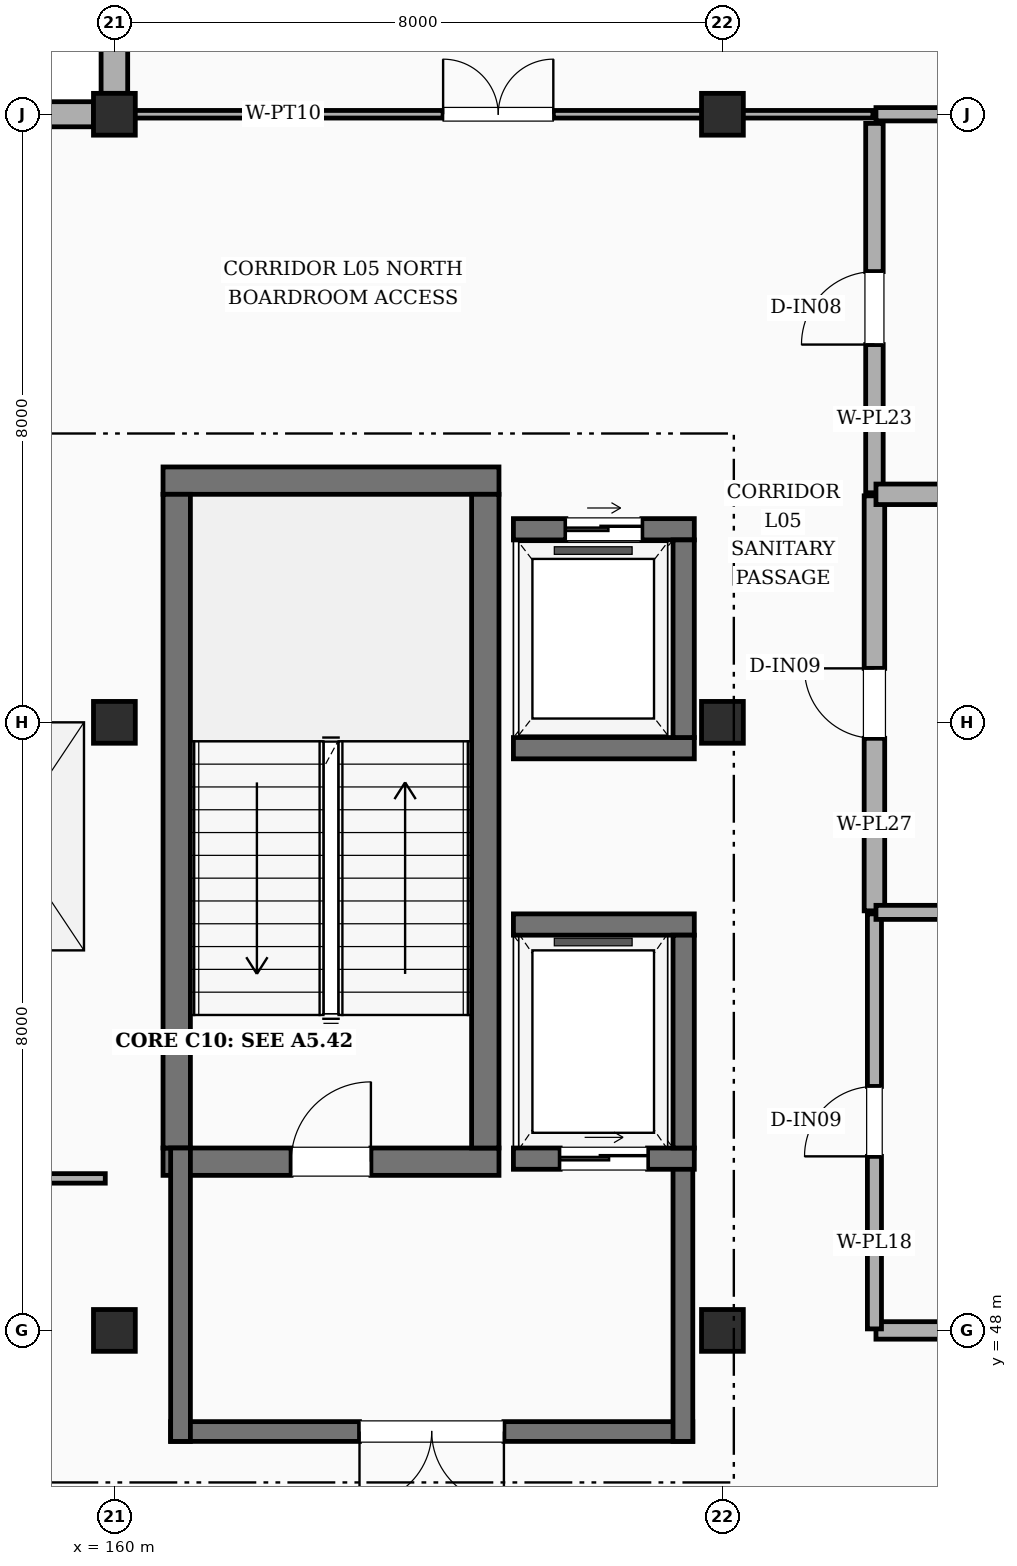
"""IFC4 building model, lengths in metres.
Left out: names, types, materials, properties, quantities, classifications, styles, units other than length and angle.
Written with IfcOpenShell. Run it as: python <this file> out.ifc"""

import sys

from ifc_helpers import new_model, si_unit, direction, frame, frame_2d, origin, origin_2d, place, context, subcontext, project, spatial, rectangle, extrude, element, fill, save


model = new_model("IFC4")
c1 = context("Model", 3, precision=1e-05, world=origin(), true_north=direction((0.0, 1.0)))
c2 = subcontext(c1, "Body", "Model", "MODEL_VIEW")
j1 = project(units=[si_unit("LENGTHUNIT", "METRE"), si_unit("PLANEANGLEUNIT", "RADIAN")], contexts=[c1])
p1 = place(None, origin())
s1 = spatial("IfcSite", under=j1, at=p1, CompositionType="ELEMENT")
p2 = place(p1, origin())
s2 = spatial("IfcBuilding", under=s1, at=p2, CompositionType="ELEMENT")
p3 = place(p2, frame((0.0, 0.0, 23.4)))
s3 = spatial("IfcBuildingStorey", under=s2, at=p3, CompositionType="ELEMENT", Elevation=23.4)
for number, where, z_axis, x_axis in (
    (1, (160.0, 48.0, 0.0), (0.0, 0.0, 1.0), (1.0, 0.0, 0.0)),
    (2, (160.0, 56.0, 0.0), (0.0, 0.0, 1.0), (1.0, 0.0, 0.0)),
    (3, (160.0, 64.0, 0.0), (0.0, 0.0, 1.0), (1.0, 0.0, 0.0)),
    (4, (168.0, 48.0, 0.0), (0.0, 0.0, 1.0), (1.0, 0.0, 0.0)),
    (5, (168.0, 56.0, 0.0), (0.0, 0.0, 1.0), (1.0, 0.0, 0.0)),
    (6, (168.0, 64.0, 0.0), (0.0, 0.0, 1.0), (1.0, 0.0, 0.0)),
):
    element("IfcColumn", number, at=place(p3, frame(where, z_axis=z_axis, x_axis=x_axis)), inside=s3, PredefinedType="COLUMN", context=c2, shape_type="SweptSolid", body=[
        extrude(rectangle(XDim=0.55, YDim=0.55, at=origin_2d()), origin(), (0.0, 0.0, 1.0), 4.2),
    ])
p4 = place(p3, frame((160.0, 71.725, 0.0), z_axis=(0.0, 0.0, 1.0), x_axis=(0.0, -1.0, 0.0)))
e7 = element("IfcWall", 7, at=p4, inside=s3, PredefinedType="STANDARD", context=c2, shape_type="SweptSolid", body=[
    extrude(rectangle(XDim=7.45, YDim=0.35, at=frame_2d((3.725, 0.0))), origin(), (0.0, 0.0, 1.0), 3.442),
])
p5 = place(p4, frame((2.75, 0.0, 0.95)))
e8 = element("IfcOpeningElement", 8, at=p5, cuts=e7, PredefinedType="OPENING", context=c2, shape_type="SweptSolid", body=[
    extrude(rectangle(XDim=1.95, YDim=1.95, at=frame_2d((0.975, 0.975))), frame((0.0, 0.185, 0.0), z_axis=(0.0, -1.0, 0.0), x_axis=(1.0, 0.0, 0.0)), (0.0, 0.0, 1.0), 0.37),
])
p6 = place(p3, frame((159.725, 64.0, 0.0), z_axis=(0.0, 0.0, 1.0), x_axis=(-1.0, 0.0, 0.0)))
e9 = element("IfcWall", 9, at=p6, inside=s3, PredefinedType="STANDARD", context=c2, shape_type="SweptSolid", body=[
    extrude(rectangle(XDim=7.45, YDim=0.33, at=frame_2d((3.725, 0.0))), origin(), (0.0, 0.0, 1.0), 3.97),
])
p7 = place(p6, frame((2.4, 0.0, 0.95)))
e10 = element("IfcOpeningElement", 10, at=p7, cuts=e9, PredefinedType="OPENING", context=c2, shape_type="SweptSolid", body=[
    extrude(rectangle(XDim=2.65, YDim=1.95, at=frame_2d((1.325, 0.975))), frame((0.0, 0.175, 0.0), z_axis=(0.0, -1.0, 0.0), x_axis=(1.0, 0.0, 0.0)), (0.0, 0.0, 1.0), 0.35),
])
p8 = place(p3, frame((160.64, 50.22, 0.0), z_axis=(0.0, 0.0, 1.0), x_axis=(1.0, 0.0, 0.0)))
e11 = element("IfcWall", 11, at=p8, inside=s3, PredefinedType="SHEAR", context=c2, shape_type="SweptSolid", body=[
    extrude(rectangle(XDim=4.42, YDim=0.36, at=frame_2d((2.21, 0.0))), origin(), (0.0, 0.0, 1.0), 4.2),
])
p9 = place(p8, frame((1.685, 0.0, 0.0)))
e12 = element("IfcOpeningElement", 12, at=p9, cuts=e11, PredefinedType="OPENING", context=c2, shape_type="SweptSolid", body=[
    extrude(rectangle(XDim=1.05, YDim=2.15, at=frame_2d((0.525, 1.075))), frame((0.0, 0.19, 0.0), z_axis=(0.0, -1.0, 0.0), x_axis=(1.0, 0.0, 0.0)), (0.0, 0.0, 1.0), 0.38),
])
p10 = place(p3, frame((160.64, 59.18, 0.0), z_axis=(0.0, 0.0, 1.0), x_axis=(1.0, 0.0, 0.0)))
e13 = element("IfcWall", 13, at=p10, inside=s3, PredefinedType="SHEAR", context=c2, shape_type="SweptSolid", body=[
    extrude(rectangle(XDim=4.42, YDim=0.36, at=frame_2d((2.21, 0.0))), origin(), (0.0, 0.0, 1.0), 4.2),
])
for number, where, z_axis, x_axis in (
    (14, (160.82, 50.4, 0.0), (0.0, 0.0, 1.0), (0.0, 1.0, 0.0)),
    (15, (164.88, 50.4, 0.0), (0.0, 0.0, 1.0), (0.0, 1.0, 0.0)),
):
    element("IfcWall", number, at=place(p3, frame(where, z_axis=z_axis, x_axis=x_axis)), inside=s3, PredefinedType="SHEAR", context=c2, shape_type="SweptSolid", body=[
        extrude(rectangle(XDim=8.6, YDim=0.36, at=frame_2d((4.3, 0.0))), origin(), (0.0, 0.0, 1.0), 4.2),
    ])
p11 = place(p3, frame((167.61, 46.67, 0.0), z_axis=(0.0, 0.0, 1.0), x_axis=(-1.0, 0.0, 0.0)))
e16 = element("IfcWall", 16, at=p11, inside=s3, PredefinedType="SHEAR", context=c2, shape_type="SweptSolid", body=[
    extrude(rectangle(XDim=6.87, YDim=0.26, at=frame_2d((3.435, 0.0))), origin(), (0.0, 0.0, 1.0), 4.2),
])
p12 = place(p11, frame((2.485, 0.0, 0.0)))
e17 = element("IfcOpeningElement", 17, at=p12, cuts=e16, PredefinedType="OPENING", context=c2, shape_type="SweptSolid", body=[
    extrude(rectangle(XDim=1.9, YDim=2.25, at=frame_2d((0.95, 1.125))), frame((0.0, 0.14, 0.0), z_axis=(0.0, -1.0, 0.0), x_axis=(1.0, 0.0, 0.0)), (0.0, 0.0, 1.0), 0.28),
])
for number, where, z_axis, x_axis in (
    (18, (160.87, 46.54, 0.0), (0.0, 0.0, 1.0), (0.0, 1.0, 0.0)),
    (19, (167.48, 46.54, 0.0), (0.0, 0.0, 1.0), (0.0, 1.0, 0.0)),
):
    element("IfcWall", number, at=place(p3, frame(where, z_axis=z_axis, x_axis=x_axis)), inside=s3, PredefinedType="SHEAR", context=c2, shape_type="SweptSolid", body=[
        extrude(rectangle(XDim=3.86, YDim=0.26, at=frame_2d((1.93, 0.0))), origin(), (0.0, 0.0, 1.0), 4.2),
    ])
p13 = place(p3, frame((165.25, 50.26, 0.0), z_axis=(0.0, 0.0, 1.0), x_axis=(1.0, 0.0, 0.0)))
e20 = element("IfcWall", 20, at=p13, inside=s3, PredefinedType="SHEAR", context=c2, shape_type="SweptSolid", body=[
    extrude(rectangle(XDim=2.38, YDim=0.28, at=frame_2d((1.19, 0.0))), origin(), (0.0, 0.0, 1.0), 4.2),
])
p14 = place(p13, frame((0.615, 0.0, 0.0)))
e21 = element("IfcOpeningElement", 21, at=p14, cuts=e20, PredefinedType="OPENING", context=c2, shape_type="SweptSolid", body=[
    extrude(rectangle(XDim=1.15, YDim=2.2, at=frame_2d((0.575, 1.1))), frame((0.0, 0.15, 0.0), z_axis=(0.0, -1.0, 0.0), x_axis=(1.0, 0.0, 0.0)), (0.0, 0.0, 1.0), 0.3),
])
p15 = place(p3, frame((165.25, 53.34, 0.0), z_axis=(0.0, 0.0, 1.0), x_axis=(1.0, 0.0, 0.0)))
e22 = element("IfcWall", 22, at=p15, inside=s3, PredefinedType="SHEAR", context=c2, shape_type="SweptSolid", body=[
    extrude(rectangle(XDim=2.38, YDim=0.28, at=frame_2d((1.19, 0.0))), origin(), (0.0, 0.0, 1.0), 4.2),
])
p16 = place(p3, frame((167.49, 50.4, 0.0), z_axis=(0.0, 0.0, 1.0), x_axis=(0.0, 1.0, 0.0)))
e23 = element("IfcWall", 23, at=p16, inside=s3, PredefinedType="SHEAR", context=c2, shape_type="SweptSolid", body=[
    extrude(rectangle(XDim=2.8, YDim=0.28, at=frame_2d((1.4, 0.0))), origin(), (0.0, 0.0, 1.0), 4.2),
])
p17 = place(p3, frame((165.25, 55.66, 0.0), z_axis=(0.0, 0.0, 1.0), x_axis=(1.0, 0.0, 0.0)))
e24 = element("IfcWall", 24, at=p17, inside=s3, PredefinedType="SHEAR", context=c2, shape_type="SweptSolid", body=[
    extrude(rectangle(XDim=2.38, YDim=0.28, at=frame_2d((1.19, 0.0))), origin(), (0.0, 0.0, 1.0), 4.2),
])
p18 = place(p3, frame((165.25, 58.54, 0.0), z_axis=(0.0, 0.0, 1.0), x_axis=(1.0, 0.0, 0.0)))
e25 = element("IfcWall", 25, at=p18, inside=s3, PredefinedType="SHEAR", context=c2, shape_type="SweptSolid", body=[
    extrude(rectangle(XDim=2.38, YDim=0.28, at=frame_2d((1.19, 0.0))), origin(), (0.0, 0.0, 1.0), 4.2),
])
p19 = place(p18, frame((0.69, 0.0, 0.0)))
e26 = element("IfcOpeningElement", 26, at=p19, cuts=e25, PredefinedType="OPENING", context=c2, shape_type="SweptSolid", body=[
    extrude(rectangle(XDim=1.0, YDim=2.15, at=frame_2d((0.5, 1.075))), frame((0.0, 0.15, 0.0), z_axis=(0.0, -1.0, 0.0), x_axis=(1.0, 0.0, 0.0)), (0.0, 0.0, 1.0), 0.3),
])
p20 = place(p3, frame((167.49, 55.8, 0.0), z_axis=(0.0, 0.0, 1.0), x_axis=(0.0, 1.0, 0.0)))
e27 = element("IfcWall", 27, at=p20, inside=s3, PredefinedType="SHEAR", context=c2, shape_type="SweptSolid", body=[
    extrude(rectangle(XDim=2.6, YDim=0.28, at=frame_2d((1.3, 0.0))), origin(), (0.0, 0.0, 1.0), 4.2),
])
p21 = place(p3, frame((149.22, 50.0, 0.0), z_axis=(0.0, 0.0, 1.0), x_axis=(1.0, 0.0, 0.0)))
e28 = element("IfcWall", 28, at=p21, inside=s3, PredefinedType="PARTITIONING", context=c2, shape_type="SweptSolid", body=[
    extrude(rectangle(XDim=10.66, YDim=0.125, at=frame_2d((5.33, 0.0))), origin(), (0.0, 0.0, 1.0), 3.58),
])
p22 = place(p21, frame((4.705, 0.0, 0.0)))
e29 = element("IfcOpeningElement", 29, at=p22, cuts=e28, PredefinedType="OPENING", context=c2, shape_type="SweptSolid", body=[
    extrude(rectangle(XDim=1.25, YDim=2.15, at=frame_2d((0.625, 1.075))), frame((0.0, 0.073, 0.0), z_axis=(0.0, -1.0, 0.0), x_axis=(1.0, 0.0, 0.0)), (0.0, 0.0, 1.0), 0.145),
])
p23 = place(p3, frame((170.02, 48.0, 0.0), z_axis=(0.0, 0.0, 1.0), x_axis=(1.0, 0.0, 0.0)))
e30 = element("IfcWall", 30, at=p23, inside=s3, PredefinedType="PLUMBINGWALL", context=c2, shape_type="SweptSolid", body=[
    extrude(rectangle(XDim=5.86, YDim=0.23, at=frame_2d((2.93, 0.0))), origin(), (0.0, 0.0, 1.0), 3.429),
])
p24 = place(p3, frame((170.0, 48.02, 0.0), z_axis=(0.0, 0.0, 1.0), x_axis=(0.0, 1.0, 0.0)))
e31 = element("IfcWall", 31, at=p24, inside=s3, PredefinedType="PLUMBINGWALL", context=c2, shape_type="SweptSolid", body=[
    extrude(rectangle(XDim=5.46, YDim=0.185, at=frame_2d((2.73, 0.0))), origin(), (0.0, 0.0, 1.0), 3.429),
])
p25 = place(p24, frame((2.27, 0.0, 0.0)))
e32 = element("IfcOpeningElement", 32, at=p25, cuts=e31, PredefinedType="OPENING", context=c2, shape_type="SweptSolid", body=[
    extrude(rectangle(XDim=0.92, YDim=2.1, at=frame_2d((0.46, 1.05))), frame((0.0, 0.103, 0.0), z_axis=(0.0, -1.0, 0.0), x_axis=(1.0, 0.0, 0.0)), (0.0, 0.0, 1.0), 0.205),
])
p26 = place(p3, frame((170.0, 53.52, 0.0), z_axis=(0.0, 0.0, 1.0), x_axis=(0.0, 1.0, 0.0)))
e33 = element("IfcWall", 33, at=p26, inside=s3, PredefinedType="PLUMBINGWALL", context=c2, shape_type="SweptSolid", body=[
    extrude(rectangle(XDim=5.46, YDim=0.27, at=frame_2d((2.73, 0.0))), origin(), (0.0, 0.0, 1.0), 3.97),
])
p27 = place(p26, frame((2.27, 0.0, 0.0)))
e34 = element("IfcOpeningElement", 34, at=p27, cuts=e33, PredefinedType="OPENING", context=c2, shape_type="SweptSolid", body=[
    extrude(rectangle(XDim=0.92, YDim=2.1, at=frame_2d((0.46, 1.05))), frame((0.0, 0.145, 0.0), z_axis=(0.0, -1.0, 0.0), x_axis=(1.0, 0.0, 0.0)), (0.0, 0.0, 1.0), 0.29),
])
p28 = place(p3, frame((170.0, 59.02, 0.0), z_axis=(0.0, 0.0, 1.0), x_axis=(0.0, 1.0, 0.0)))
e35 = element("IfcWall", 35, at=p28, inside=s3, PredefinedType="PLUMBINGWALL", context=c2, shape_type="SweptSolid", body=[
    extrude(rectangle(XDim=4.86, YDim=0.23, at=frame_2d((2.43, 0.0))), origin(), (0.0, 0.0, 1.0), 3.429),
])
p29 = place(p28, frame((1.95, 0.0, 0.0)))
e36 = element("IfcOpeningElement", 36, at=p29, cuts=e35, PredefinedType="OPENING", context=c2, shape_type="SweptSolid", body=[
    extrude(rectangle(XDim=0.96, YDim=2.1, at=frame_2d((0.48, 1.05))), frame((0.0, 0.125, 0.0), z_axis=(0.0, -1.0, 0.0), x_axis=(1.0, 0.0, 0.0)), (0.0, 0.0, 1.0), 0.25),
])
p30 = place(p3, frame((170.02, 53.5, 0.0), z_axis=(0.0, 0.0, 1.0), x_axis=(1.0, 0.0, 0.0)))
e37 = element("IfcWall", 37, at=p30, inside=s3, PredefinedType="PLUMBINGWALL", context=c2, shape_type="SweptSolid", body=[
    extrude(rectangle(XDim=5.86, YDim=0.185, at=frame_2d((2.93, 0.0))), origin(), (0.0, 0.0, 1.0), 3.58),
])
p31 = place(p3, frame((170.02, 59.0, 0.0), z_axis=(0.0, 0.0, 1.0), x_axis=(1.0, 0.0, 0.0)))
e38 = element("IfcWall", 38, at=p31, inside=s3, PredefinedType="PLUMBINGWALL", context=c2, shape_type="SweptSolid", body=[
    extrude(rectangle(XDim=5.86, YDim=0.27, at=frame_2d((2.93, 0.0))), origin(), (0.0, 0.0, 1.0), 3.58),
])
p32 = place(p3, frame((160.12, 64.0, 0.0), z_axis=(0.0, 0.0, 1.0), x_axis=(1.0, 0.0, 0.0)))
e39 = element("IfcWall", 39, at=p32, inside=s3, PredefinedType="PARTITIONING", context=c2, shape_type="SweptSolid", body=[
    extrude(rectangle(XDim=9.86, YDim=0.1, at=frame_2d((4.93, 0.0))), origin(), (0.0, 0.0, 1.0), 3.429),
])
p33 = place(p32, frame((4.205, 0.0, 0.0)))
e40 = element("IfcOpeningElement", 40, at=p33, cuts=e39, PredefinedType="OPENING", context=c2, shape_type="SweptSolid", body=[
    extrude(rectangle(XDim=1.45, YDim=2.2, at=frame_2d((0.725, 1.1))), frame((0.0, 0.06, 0.0), z_axis=(0.0, -1.0, 0.0), x_axis=(1.0, 0.0, 0.0)), (0.0, 0.0, 1.0), 0.12),
])
p34 = place(p3, frame((170.02, 64.0, 0.0), z_axis=(0.0, 0.0, 1.0), x_axis=(1.0, 0.0, 0.0)))
e41 = element("IfcWall", 41, at=p34, inside=s3, PredefinedType="PARTITIONING", context=c2, shape_type="SweptSolid", body=[
    extrude(rectangle(XDim=5.86, YDim=0.175, at=frame_2d((2.93, 0.0))), origin(), (0.0, 0.0, 1.0), 3.429),
])
p35 = place(p2, frame((0.0, 0.0, 27.6)))
p36 = place(p35, frame((0.0, 0.0, 1.925)))
p37 = place(p36, frame((158.6, 54.5, 0.0)))
p38 = place(p37, frame((0.0, 0.0, 0.175)))
e42 = element("IfcWindow", 42, at=p38, inside=s3, PartitioningType="SINGLE_PANEL", PredefinedType="SKYLIGHT", context=c2, shape_type="SweptSolid", body=[
    extrude(rectangle(XDim=2.0, YDim=3.0, at=origin_2d()), origin(), (0.0, 0.0, 1.0), 0.05),
])
p39 = place(p9, origin())
e43 = element("IfcDoor", 43, at=p39, inside=s3, OperationType="SINGLE_SWING_RIGHT", PredefinedType="DOOR", context=c2, shape_type="SweptSolid", body=[
    extrude(rectangle(XDim=1.05, YDim=2.15, at=frame_2d((0.525, 1.075))), frame((0.0, 0.025, 0.0), z_axis=(0.0, -1.0, 0.0), x_axis=(1.0, 0.0, 0.0)), (0.0, 0.0, 1.0), 0.05),
])
fill(e12, e43)
p40 = place(p12, origin())
e44 = element("IfcDoor", 44, at=p40, inside=s3, OperationType="DOUBLE_DOOR_SINGLE_SWING", PredefinedType="DOOR", context=c2, shape_type="SweptSolid", body=[
    extrude(rectangle(XDim=1.9, YDim=2.25, at=frame_2d((0.95, 1.125))), frame((0.0, 0.025, 0.0), z_axis=(0.0, -1.0, 0.0), x_axis=(1.0, 0.0, 0.0)), (0.0, 0.0, 1.0), 0.05),
])
fill(e17, e44)
p41 = place(p14, origin())
e45 = element("IfcDoor", 45, at=p41, inside=s3, OperationType="SLIDING_TO_LEFT", PredefinedType="DOOR", context=c2, shape_type="SweptSolid", body=[
    extrude(rectangle(XDim=1.15, YDim=2.2, at=frame_2d((0.575, 1.1))), frame((0.0, 0.025, 0.0), z_axis=(0.0, -1.0, 0.0), x_axis=(1.0, 0.0, 0.0)), (0.0, 0.0, 1.0), 0.05),
])
fill(e21, e45)
p42 = place(p19, origin())
e46 = element("IfcDoor", 46, at=p42, inside=s3, OperationType="SLIDING_TO_LEFT", PredefinedType="DOOR", context=c2, shape_type="SweptSolid", body=[
    extrude(rectangle(XDim=1.0, YDim=2.15, at=frame_2d((0.5, 1.075))), frame((0.0, 0.025, 0.0), z_axis=(0.0, -1.0, 0.0), x_axis=(1.0, 0.0, 0.0)), (0.0, 0.0, 1.0), 0.05),
])
fill(e26, e46)
p43 = place(p25, origin())
e47 = element("IfcDoor", 47, at=p43, inside=s3, OperationType="SINGLE_SWING_LEFT", PredefinedType="DOOR", context=c2, shape_type="SweptSolid", body=[
    extrude(rectangle(XDim=0.92, YDim=2.1, at=frame_2d((0.46, 1.05))), frame((0.0, 0.025, 0.0), z_axis=(0.0, -1.0, 0.0), x_axis=(1.0, 0.0, 0.0)), (0.0, 0.0, 1.0), 0.05),
])
fill(e32, e47)
p44 = place(p27, origin())
e48 = element("IfcDoor", 48, at=p44, inside=s3, OperationType="SINGLE_SWING_RIGHT", PredefinedType="DOOR", context=c2, shape_type="SweptSolid", body=[
    extrude(rectangle(XDim=0.92, YDim=2.1, at=frame_2d((0.46, 1.05))), frame((0.0, 0.025, 0.0), z_axis=(0.0, -1.0, 0.0), x_axis=(1.0, 0.0, 0.0)), (0.0, 0.0, 1.0), 0.05),
])
fill(e34, e48)
p45 = place(p29, origin())
e49 = element("IfcDoor", 49, at=p45, inside=s3, OperationType="SINGLE_SWING_LEFT", PredefinedType="DOOR", context=c2, shape_type="SweptSolid", body=[
    extrude(rectangle(XDim=0.96, YDim=2.1, at=frame_2d((0.48, 1.05))), frame((0.0, 0.025, 0.0), z_axis=(0.0, -1.0, 0.0), x_axis=(1.0, 0.0, 0.0)), (0.0, 0.0, 1.0), 0.05),
])
fill(e36, e49)
p46 = place(p33, origin())
e50 = element("IfcDoor", 50, at=p46, inside=s3, OperationType="DOUBLE_DOOR_SINGLE_SWING", PredefinedType="DOOR", context=c2, shape_type="SweptSolid", body=[
    extrude(rectangle(XDim=1.45, YDim=2.2, at=frame_2d((0.725, 1.1))), frame((0.0, 0.025, 0.0), z_axis=(0.0, -1.0, 0.0), x_axis=(1.0, 0.0, 0.0)), (0.0, 0.0, 1.0), 0.05),
])
fill(e40, e50)
save(model, sys.argv[1])
